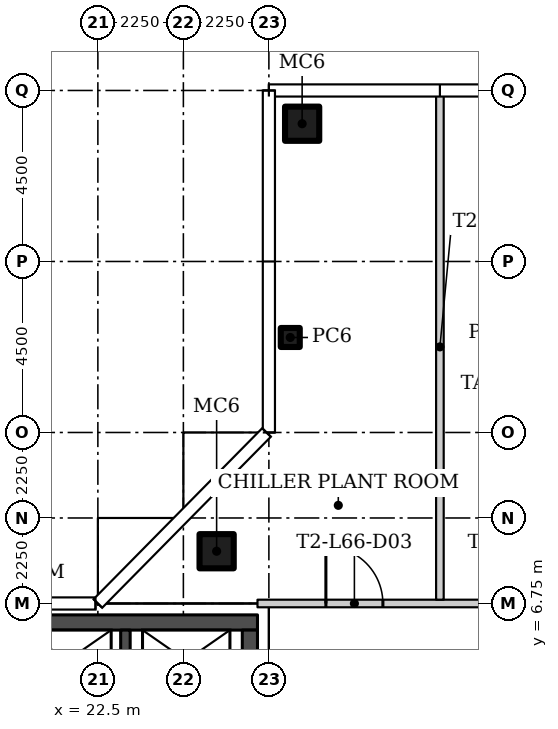
"""IFC4 building model, lengths in metres.
Left out: names, types, materials, properties, quantities, classifications, styles, units other than length and angle.
Written with IfcOpenShell. Run it as: python <this file> out.ifc"""

import sys

from ifc_helpers import new_model, si_unit, direction, frame, frame_2d, origin, origin_2d, place, context, subcontext, project, spatial, rectangle, hollow_rectangle, extrude, element, fill, save


model = new_model("IFC4")
c1 = context("Model", 3, precision=1e-05, world=origin(), true_north=direction((0.0, 1.0)))
c2 = subcontext(c1, "Body", "Model", "MODEL_VIEW")
j1 = project(units=[si_unit("LENGTHUNIT", "METRE"), si_unit("PLANEANGLEUNIT", "RADIAN")], contexts=[c1])
p1 = place(None, origin())
s1 = spatial("IfcSite", under=j1, at=p1, CompositionType="ELEMENT")
p2 = place(p1, origin())
s2 = spatial("IfcBuilding", under=s1, at=p2, CompositionType="ELEMENT")
p3 = place(p2, frame((0.0, 0.0, 273.3)))
s3 = spatial("IfcBuildingStorey", under=s2, at=p3, CompositionType="ELEMENT", Elevation=273.3)
p4 = place(p3, frame((25.625, 8.125, 0.0)))
e1 = element("IfcColumn", 1, at=p4, inside=s3, PredefinedType="COLUMN", context=c2, shape_type="SweptSolid", body=[
    extrude(hollow_rectangle(XDim=0.9, YDim=0.9, WallThickness=0.036, at=origin_2d()), origin(), (0.0, 0.0, 1.0), 4.55),
])
p5 = place(p3, frame((27.562, 13.75, 0.0)))
e2 = element("IfcColumn", 2, at=p5, inside=s3, PredefinedType="COLUMN", context=c2, shape_type="SweptSolid", body=[
    extrude(hollow_rectangle(XDim=0.5, YDim=0.5, WallThickness=0.016, at=origin_2d()), origin(), (0.0, 0.0, 1.0), 4.55),
])
p6 = place(p3, frame((27.875, 19.375, 0.0)))
e3 = element("IfcColumn", 3, at=p6, inside=s3, PredefinedType="COLUMN", context=c2, shape_type="SweptSolid", body=[
    extrude(hollow_rectangle(XDim=0.9, YDim=0.9, WallThickness=0.036, at=origin_2d()), origin(), (0.0, 0.0, 1.0), 4.55),
])
p7 = place(p3, frame((26.7, 6.75, 0.0)))
e4 = element("IfcWall", 4, at=p7, inside=s3, PredefinedType="PARTITIONING", context=c2, shape_type="SweptSolid", body=[
    extrude(rectangle(XDim=14.1, YDim=0.2, at=frame_2d((7.05, 0.0))), origin(), (0.0, 0.0, 1.0), 4.55),
])
p8 = place(p7, frame((10.8, 0.0, 0.0)))
e5 = element("IfcOpeningElement", 5, at=p8, cuts=e4, PredefinedType="OPENING", context=c2, shape_type="SweptSolid", body=[
    extrude(rectangle(XDim=1.5, YDim=2.4, at=frame_2d((0.75, 1.2))), frame((0.0, 0.11, 0.0), z_axis=(0.0, -1.0, 0.0), x_axis=(1.0, 0.0, 0.0)), (0.0, 0.0, 1.0), 0.22),
])
p9 = place(p7, frame((6.3, 0.0, 0.0)))
e6 = element("IfcOpeningElement", 6, at=p9, cuts=e4, PredefinedType="OPENING", context=c2, shape_type="SweptSolid", body=[
    extrude(rectangle(XDim=1.5, YDim=2.4, at=frame_2d((0.75, 1.2))), frame((0.0, 0.11, 0.0), z_axis=(0.0, -1.0, 0.0), x_axis=(1.0, 0.0, 0.0)), (0.0, 0.0, 1.0), 0.22),
])
p10 = place(p7, frame((1.8, 0.0, 0.0)))
e7 = element("IfcOpeningElement", 7, at=p10, cuts=e4, PredefinedType="OPENING", context=c2, shape_type="SweptSolid", body=[
    extrude(rectangle(XDim=1.5, YDim=2.4, at=frame_2d((0.75, 1.2))), frame((0.0, 0.11, 0.0), z_axis=(0.0, -1.0, 0.0), x_axis=(1.0, 0.0, 0.0)), (0.0, 0.0, 1.0), 0.22),
])
p11 = place(p3, frame((31.5, 20.155, 0.0), z_axis=(0.0, 0.0, 1.0), x_axis=(0.0, -1.0, 0.0)))
e8 = element("IfcWall", 8, at=p11, inside=s3, PredefinedType="PARTITIONING", context=c2, shape_type="SweptSolid", body=[
    extrude(rectangle(XDim=13.305, YDim=0.2, at=frame_2d((6.652, 0.0))), origin(), (0.0, 0.0, 1.0), 4.55),
])
p12 = place(p3, frame((13.8, 6.25, 0.0)))
e9 = element("IfcWall", 9, at=p12, inside=s3, PredefinedType="SHEAR", context=c2, shape_type="SweptSolid", body=[
    extrude(rectangle(XDim=12.9, YDim=0.4, at=frame_2d((6.45, 0.0))), origin(), (0.0, 0.0, 1.0), 4.55),
])
p13 = place(p3, frame((26.5, 6.05, 0.0), z_axis=(0.0, 0.0, 1.0), x_axis=(0.0, -1.0, 0.0)))
e10 = element("IfcWall", 10, at=p13, inside=s3, PredefinedType="SHEAR", context=c2, shape_type="SweptSolid", body=[
    extrude(rectangle(XDim=12.1, YDim=0.4, at=frame_2d((6.05, 0.0))), origin(), (0.0, 0.0, 1.0), 4.55),
])
p14 = place(p13, frame((10.1, 0.0, 0.0)))
e11 = element("IfcOpeningElement", 11, at=p14, cuts=e10, PredefinedType="OPENING", context=c2, shape_type="SweptSolid", body=[
    extrude(rectangle(XDim=1.2, YDim=2.1, at=frame_2d((0.6, 1.05))), frame((0.0, 0.21, 0.0), z_axis=(0.0, -1.0, 0.0), x_axis=(1.0, 0.0, 0.0)), (0.0, 0.0, 1.0), 0.42),
])
p15 = place(p13, frame((3.9, 0.0, 0.0)))
e12 = element("IfcOpeningElement", 12, at=p15, cuts=e10, PredefinedType="OPENING", context=c2, shape_type="SweptSolid", body=[
    extrude(rectangle(XDim=1.8, YDim=2.4, at=frame_2d((0.9, 1.2))), frame((0.0, 0.21, 0.0), z_axis=(0.0, -1.0, 0.0), x_axis=(1.0, 0.0, 0.0)), (0.0, 0.0, 1.0), 0.42),
])
p16 = place(p3, frame((23.225, 3.25, 0.0), z_axis=(0.0, 0.0, 1.0), x_axis=(0.0, 1.0, 0.0)))
e13 = element("IfcWall", 13, at=p16, inside=s3, PredefinedType="SHEAR", context=c2, shape_type="SweptSolid", body=[
    extrude(rectangle(XDim=2.8, YDim=0.25, at=frame_2d((1.4, 0.0))), origin(), (0.0, 0.0, 1.0), 4.55),
])
p17 = place(p10, origin())
e14 = element("IfcDoor", 14, at=p17, inside=s3, OperationType="DOUBLE_DOOR_SINGLE_SWING", PredefinedType="DOOR", context=c2, shape_type="SweptSolid", body=[
    extrude(rectangle(XDim=1.5, YDim=2.4, at=frame_2d((0.75, 1.2))), frame((0.0, 0.025, 0.0), z_axis=(0.0, -1.0, 0.0), x_axis=(1.0, 0.0, 0.0)), (0.0, 0.0, 1.0), 0.05),
])
fill(e7, e14)
save(model, sys.argv[1])
